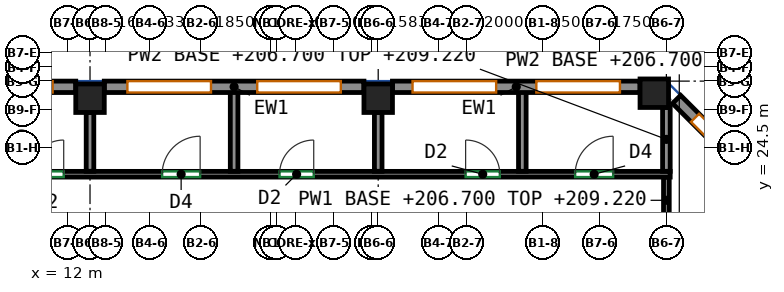
"""IFC4 building model, lengths in metres.
Left out: names, types, materials, properties, quantities, classifications, styles, units other than length and angle.
Written with IfcOpenShell. Run it as: python <this file> out.ifc"""

import sys

from ifc_helpers import new_model, si_unit, direction, frame, frame_2d, origin, origin_2d, place, context, subcontext, project, spatial, rectangle, extrude, source, transform, mapped, element, fill, save


model = new_model("IFC4")
c1 = context("Model", 3, precision=1e-05, world=origin(), true_north=direction((0.0, 1.0)))
c2 = subcontext(c1, "Body", "Model", "MODEL_VIEW")
j1 = project(units=[si_unit("LENGTHUNIT", "METRE"), si_unit("PLANEANGLEUNIT", "RADIAN")], contexts=[c1])
p1 = place(None, origin())
s1 = spatial("IfcSite", under=j1, at=p1, CompositionType="ELEMENT")
p2 = place(p1, origin())
s2 = spatial("IfcBuilding", under=s1, at=p2, CompositionType="ELEMENT")
p3 = place(p2, frame((0.0, 0.0, 206.7)))
s3 = spatial("IfcBuildingStorey", under=s2, at=p3, CompositionType="ELEMENT", Elevation=206.7)
m1 = source(origin(), c2, "Body", "SweptSolid", [
    extrude(rectangle(XDim=0.75, YDim=0.75, at=origin_2d()), origin(), (0.0, 0.0, 1.0), 3.12),
])
for number, where, z_axis, x_axis in (
    (1, (12.583, 25.8, 0.0), (0.0, 0.0, 1.0), (1.0, 0.0, 0.0)),
    (2, (20.167, 25.8, 0.0), (0.0, 0.0, 1.0), (1.0, 0.0, 0.0)),
    (3, (27.432, 25.932, 0.0), (0.0, 0.0, 1.0), (1.0, 0.0, 0.0)),
):
    element("IfcColumn", number, at=place(p3, frame(where, z_axis=z_axis, x_axis=x_axis)), inside=s3, PredefinedType="COLUMN", context=c2, shape_type="MappedRepresentation", body=[
        mapped(m1, transform((0.0, 0.0, 0.0))),
    ])
m2 = source(origin(), c2, "Body", "SweptSolid", [
    extrude(rectangle(XDim=3.571, YDim=0.3, at=frame_2d((1.786, 0.0))), origin(), (0.0, 0.0, 1.0), 3.12),
])
p4 = place(p3, frame((30.544, 23.244, 0.0), z_axis=(0.0, 0.0, 1.0), x_axis=(-0.707140964879, 0.707072595841, 0.0)))
e4 = element("IfcWall", 4, at=p4, inside=s3, PredefinedType="SOLIDWALL", context=c2, shape_type="MappedRepresentation", body=[
    mapped(m2, transform((0.0, 0.0, 0.0))),
])
p5 = place(p4, frame((0.686, 0.0, 0.85)))
e5 = element("IfcOpeningElement", 5, at=p5, cuts=e4, PredefinedType="OPENING", context=c2, shape_type="SweptSolid", body=[
    extrude(rectangle(XDim=2.2, YDim=1.95, at=frame_2d((1.1, 0.975))), frame((0.0, 0.16, 0.0), z_axis=(0.0, -1.0, 0.0), x_axis=(1.0, 0.0, 0.0)), (0.0, 0.0, 1.0), 0.32),
])
m3 = source(origin(), c2, "Body", "SweptSolid", [
    extrude(rectangle(XDim=6.515, YDim=0.3, at=frame_2d((3.258, 0.0))), origin(), (0.0, 0.0, 1.0), 3.12),
])
p6 = place(p3, frame((27.057, 26.1, 0.0), z_axis=(0.0, 0.0, 1.0), x_axis=(-1.0, 0.0, 0.0)))
e6 = element("IfcWall", 6, at=p6, inside=s3, PredefinedType="SOLIDWALL", context=c2, shape_type="MappedRepresentation", body=[
    mapped(m3, transform((0.0, 0.0, 0.0))),
])
p7 = place(p6, frame((0.529, 0.0, 0.85)))
e7 = element("IfcOpeningElement", 7, at=p7, cuts=e6, PredefinedType="OPENING", context=c2, shape_type="SweptSolid", body=[
    extrude(rectangle(XDim=2.2, YDim=1.95, at=frame_2d((1.1, 0.975))), frame((0.0, 0.16, 0.0), z_axis=(0.0, -1.0, 0.0), x_axis=(1.0, 0.0, 0.0)), (0.0, 0.0, 1.0), 0.32),
])
p8 = place(p6, frame((3.786, 0.0, 0.85)))
e8 = element("IfcOpeningElement", 8, at=p8, cuts=e6, PredefinedType="OPENING", context=c2, shape_type="SweptSolid", body=[
    extrude(rectangle(XDim=2.2, YDim=1.95, at=frame_2d((1.1, 0.975))), frame((0.0, 0.16, 0.0), z_axis=(0.0, -1.0, 0.0), x_axis=(1.0, 0.0, 0.0)), (0.0, 0.0, 1.0), 0.32),
])
m4 = source(origin(), c2, "Body", "SweptSolid", [
    extrude(rectangle(XDim=6.833, YDim=0.3, at=frame_2d((3.417, 0.0))), origin(), (0.0, 0.0, 1.0), 3.12),
])
p9 = place(p3, frame((19.792, 26.1, 0.0), z_axis=(0.0, 0.0, 1.0), x_axis=(-1.0, 0.0, 0.0)))
e9 = element("IfcWall", 9, at=p9, inside=s3, PredefinedType="SOLIDWALL", context=c2, shape_type="MappedRepresentation", body=[
    mapped(m4, transform((0.0, 0.0, 0.0))),
])
p10 = place(p9, frame((0.608, 0.0, 0.85)))
e10 = element("IfcOpeningElement", 10, at=p10, cuts=e9, PredefinedType="OPENING", context=c2, shape_type="SweptSolid", body=[
    extrude(rectangle(XDim=2.2, YDim=1.95, at=frame_2d((1.1, 0.975))), frame((0.0, 0.16, 0.0), z_axis=(0.0, -1.0, 0.0), x_axis=(1.0, 0.0, 0.0)), (0.0, 0.0, 1.0), 0.32),
])
p11 = place(p9, frame((4.025, 0.0, 0.85)))
e11 = element("IfcOpeningElement", 11, at=p11, cuts=e9, PredefinedType="OPENING", context=c2, shape_type="SweptSolid", body=[
    extrude(rectangle(XDim=2.2, YDim=1.95, at=frame_2d((1.1, 0.975))), frame((0.0, 0.16, 0.0), z_axis=(0.0, -1.0, 0.0), x_axis=(1.0, 0.0, 0.0)), (0.0, 0.0, 1.0), 0.32),
])
m5 = source(origin(), c2, "Body", "SweptSolid", [
    extrude(rectangle(XDim=6.833, YDim=0.3, at=frame_2d((3.417, 0.0))), origin(), (0.0, 0.0, 1.0), 3.12),
])
p12 = place(p3, frame((12.208, 26.1, 0.0), z_axis=(0.0, 0.0, 1.0), x_axis=(-1.0, 0.0, 0.0)))
e12 = element("IfcWall", 12, at=p12, inside=s3, PredefinedType="SOLIDWALL", context=c2, shape_type="MappedRepresentation", body=[
    mapped(m5, transform((0.0, 0.0, 0.0))),
])
p13 = place(p12, frame((0.608, 0.0, 0.85)))
e13 = element("IfcOpeningElement", 13, at=p13, cuts=e12, PredefinedType="OPENING", context=c2, shape_type="SweptSolid", body=[
    extrude(rectangle(XDim=2.2, YDim=1.95, at=frame_2d((1.1, 0.975))), frame((0.0, 0.16, 0.0), z_axis=(0.0, -1.0, 0.0), x_axis=(1.0, 0.0, 0.0)), (0.0, 0.0, 1.0), 0.32),
])
p14 = place(p12, frame((4.025, 0.0, 0.85)))
e14 = element("IfcOpeningElement", 14, at=p14, cuts=e12, PredefinedType="OPENING", context=c2, shape_type="SweptSolid", body=[
    extrude(rectangle(XDim=2.2, YDim=1.95, at=frame_2d((1.1, 0.975))), frame((0.0, 0.16, 0.0), z_axis=(0.0, -1.0, 0.0), x_axis=(1.0, 0.0, 0.0)), (0.0, 0.0, 1.0), 0.32),
])
p15 = place(p3, frame((27.75, 22.503, 0.0), z_axis=(0.0, 0.0, 1.0), x_axis=(0.0, 1.0, 0.0)))
e15 = element("IfcWall", 15, at=p15, inside=s3, PredefinedType="PARTITIONING", context=c2, shape_type="SweptSolid", body=[
    extrude(rectangle(XDim=1.222, YDim=0.15, at=frame_2d((0.611, 0.0))), origin(), (0.0, 0.0, 1.0), 2.52),
])
p16 = place(p3, frame((-17.85, 23.8, 0.0), z_axis=(0.0, 0.0, 1.0), x_axis=(1.0, 0.0, 0.0)))
e16 = element("IfcWall", 16, at=p16, inside=s3, PredefinedType="PARTITIONING", context=c2, shape_type="SweptSolid", body=[
    extrude(rectangle(XDim=45.7, YDim=0.15, at=frame_2d((22.85, 0.0))), origin(), (0.0, 0.0, 1.0), 3.12),
])
p17 = place(p16, frame((0.6, 0.0, 0.0)))
e17 = element("IfcOpeningElement", 17, at=p17, cuts=e16, PredefinedType="OPENING", context=c2, shape_type="SweptSolid", body=[
    extrude(rectangle(XDim=0.9, YDim=2.1, at=frame_2d((0.45, 1.05))), frame((0.0, 0.085, 0.0), z_axis=(0.0, -1.0, 0.0), x_axis=(1.0, 0.0, 0.0)), (0.0, 0.0, 1.0), 0.17),
])
p18 = place(p16, frame((4.081, 0.0, 0.0)))
e18 = element("IfcOpeningElement", 18, at=p18, cuts=e16, PredefinedType="OPENING", context=c2, shape_type="SweptSolid", body=[
    extrude(rectangle(XDim=1.0, YDim=2.1, at=frame_2d((0.5, 1.05))), frame((0.0, 0.085, 0.0), z_axis=(0.0, -1.0, 0.0), x_axis=(1.0, 0.0, 0.0)), (0.0, 0.0, 1.0), 0.17),
])
p19 = place(p16, frame((9.481, 0.0, 0.0)))
e19 = element("IfcOpeningElement", 19, at=p19, cuts=e16, PredefinedType="OPENING", context=c2, shape_type="SweptSolid", body=[
    extrude(rectangle(XDim=0.9, YDim=2.1, at=frame_2d((0.45, 1.05))), frame((0.0, 0.085, 0.0), z_axis=(0.0, -1.0, 0.0), x_axis=(1.0, 0.0, 0.0)), (0.0, 0.0, 1.0), 0.17),
])
p20 = place(p16, frame((12.803, 0.0, 0.0)))
e20 = element("IfcOpeningElement", 20, at=p20, cuts=e16, PredefinedType="OPENING", context=c2, shape_type="SweptSolid", body=[
    extrude(rectangle(XDim=1.0, YDim=2.1, at=frame_2d((0.5, 1.05))), frame((0.0, 0.085, 0.0), z_axis=(0.0, -1.0, 0.0), x_axis=(1.0, 0.0, 0.0)), (0.0, 0.0, 1.0), 0.17),
])
p21 = place(p16, frame((15.489, 0.0, 0.0)))
e21 = element("IfcOpeningElement", 21, at=p21, cuts=e16, PredefinedType="OPENING", context=c2, shape_type="SweptSolid", body=[
    extrude(rectangle(XDim=0.9, YDim=2.1, at=frame_2d((0.45, 1.05))), frame((0.0, 0.085, 0.0), z_axis=(0.0, -1.0, 0.0), x_axis=(1.0, 0.0, 0.0)), (0.0, 0.0, 1.0), 0.17),
])
p22 = place(p16, frame((21.244, 0.0, 0.0)))
e22 = element("IfcOpeningElement", 22, at=p22, cuts=e16, PredefinedType="OPENING", context=c2, shape_type="SweptSolid", body=[
    extrude(rectangle(XDim=0.9, YDim=2.1, at=frame_2d((0.45, 1.05))), frame((0.0, 0.085, 0.0), z_axis=(0.0, -1.0, 0.0), x_axis=(1.0, 0.0, 0.0)), (0.0, 0.0, 1.0), 0.17),
])
p23 = place(p16, frame((23.542, 0.0, 0.0)))
e23 = element("IfcOpeningElement", 23, at=p23, cuts=e16, PredefinedType="OPENING", context=c2, shape_type="SweptSolid", body=[
    extrude(rectangle(XDim=1.0, YDim=2.1, at=frame_2d((0.5, 1.05))), frame((0.0, 0.085, 0.0), z_axis=(0.0, -1.0, 0.0), x_axis=(1.0, 0.0, 0.0)), (0.0, 0.0, 1.0), 0.17),
])
p24 = place(p16, frame((28.841, 0.0, 0.0)))
e24 = element("IfcOpeningElement", 24, at=p24, cuts=e16, PredefinedType="OPENING", context=c2, shape_type="SweptSolid", body=[
    extrude(rectangle(XDim=0.9, YDim=2.1, at=frame_2d((0.45, 1.05))), frame((0.0, 0.085, 0.0), z_axis=(0.0, -1.0, 0.0), x_axis=(1.0, 0.0, 0.0)), (0.0, 0.0, 1.0), 0.17),
])
p25 = place(p16, frame((32.331, 0.0, 0.0)))
e25 = element("IfcOpeningElement", 25, at=p25, cuts=e16, PredefinedType="OPENING", context=c2, shape_type="SweptSolid", body=[
    extrude(rectangle(XDim=1.0, YDim=2.1, at=frame_2d((0.5, 1.05))), frame((0.0, 0.085, 0.0), z_axis=(0.0, -1.0, 0.0), x_axis=(1.0, 0.0, 0.0)), (0.0, 0.0, 1.0), 0.17),
])
p26 = place(p16, frame((35.42, 0.0, 0.0)))
e26 = element("IfcOpeningElement", 26, at=p26, cuts=e16, PredefinedType="OPENING", context=c2, shape_type="SweptSolid", body=[
    extrude(rectangle(XDim=0.9, YDim=2.1, at=frame_2d((0.45, 1.05))), frame((0.0, 0.085, 0.0), z_axis=(0.0, -1.0, 0.0), x_axis=(1.0, 0.0, 0.0)), (0.0, 0.0, 1.0), 0.17),
])
p27 = place(p16, frame((40.317, 0.0, 0.0)))
e27 = element("IfcOpeningElement", 27, at=p27, cuts=e16, PredefinedType="OPENING", context=c2, shape_type="SweptSolid", body=[
    extrude(rectangle(XDim=0.9, YDim=2.1, at=frame_2d((0.45, 1.05))), frame((0.0, 0.085, 0.0), z_axis=(0.0, -1.0, 0.0), x_axis=(1.0, 0.0, 0.0)), (0.0, 0.0, 1.0), 0.17),
])
p28 = place(p16, frame((43.199, 0.0, 0.0)))
e28 = element("IfcOpeningElement", 28, at=p28, cuts=e16, PredefinedType="OPENING", context=c2, shape_type="SweptSolid", body=[
    extrude(rectangle(XDim=1.0, YDim=2.1, at=frame_2d((0.5, 1.05))), frame((0.0, 0.085, 0.0), z_axis=(0.0, -1.0, 0.0), x_axis=(1.0, 0.0, 0.0)), (0.0, 0.0, 1.0), 0.17),
])
p29 = place(p3, frame((27.75, 25.557, 0.0), z_axis=(0.0, 0.0, 1.0), x_axis=(0.0, -1.0, 0.0)))
e29 = element("IfcWall", 29, at=p29, inside=s3, PredefinedType="PARTITIONING", context=c2, shape_type="SweptSolid", body=[
    extrude(rectangle(XDim=1.68, YDim=0.2, at=frame_2d((0.84, 0.0))), origin(), (0.0, 0.0, 1.0), 2.52),
])
p30 = place(p3, frame((12.583, 23.877, 0.0), z_axis=(0.0, 0.0, 1.0), x_axis=(0.0, 1.0, 0.0)))
e30 = element("IfcWall", 30, at=p30, inside=s3, PredefinedType="PARTITIONING", context=c2, shape_type="SweptSolid", body=[
    extrude(rectangle(XDim=1.548, YDim=0.2, at=frame_2d((0.774, 0.0))), origin(), (0.0, 0.0, 1.0), 3.12),
])
p31 = place(p3, frame((16.375, 23.877, 0.0), z_axis=(0.0, 0.0, 1.0), x_axis=(0.0, 1.0, 0.0)))
e31 = element("IfcWall", 31, at=p31, inside=s3, PredefinedType="PARTITIONING", context=c2, shape_type="SweptSolid", body=[
    extrude(rectangle(XDim=2.123, YDim=0.2, at=frame_2d((1.062, 0.0))), origin(), (0.0, 0.0, 1.0), 3.12),
])
p32 = place(p3, frame((20.167, 23.877, 0.0), z_axis=(0.0, 0.0, 1.0), x_axis=(0.0, 1.0, 0.0)))
e32 = element("IfcWall", 32, at=p32, inside=s3, PredefinedType="PARTITIONING", context=c2, shape_type="SweptSolid", body=[
    extrude(rectangle(XDim=1.548, YDim=0.2, at=frame_2d((0.774, 0.0))), origin(), (0.0, 0.0, 1.0), 3.12),
])
p33 = place(p3, frame((23.959, 23.877, 0.0), z_axis=(0.0, 0.0, 1.0), x_axis=(0.0, 1.0, 0.0)))
e33 = element("IfcWall", 33, at=p33, inside=s3, PredefinedType="PARTITIONING", context=c2, shape_type="SweptSolid", body=[
    extrude(rectangle(XDim=2.123, YDim=0.2, at=frame_2d((1.062, 0.0))), origin(), (0.0, 0.0, 1.0), 3.12),
])
p34 = place(p5, origin())
e34 = element("IfcWindow", 34, at=p34, inside=s3, PartitioningType="SINGLE_PANEL", PredefinedType="WINDOW", context=c2, shape_type="SweptSolid", body=[
    extrude(rectangle(XDim=2.2, YDim=1.95, at=frame_2d((1.1, 0.975))), frame((0.0, 0.03, 0.0), z_axis=(0.0, -1.0, 0.0), x_axis=(1.0, 0.0, 0.0)), (0.0, 0.0, 1.0), 0.06),
])
fill(e5, e34)
p35 = place(p7, origin())
e35 = element("IfcWindow", 35, at=p35, inside=s3, PartitioningType="SINGLE_PANEL", PredefinedType="WINDOW", context=c2, shape_type="SweptSolid", body=[
    extrude(rectangle(XDim=2.2, YDim=1.95, at=frame_2d((1.1, 0.975))), frame((0.0, 0.03, 0.0), z_axis=(0.0, -1.0, 0.0), x_axis=(1.0, 0.0, 0.0)), (0.0, 0.0, 1.0), 0.06),
])
fill(e7, e35)
p36 = place(p8, origin())
e36 = element("IfcWindow", 36, at=p36, inside=s3, PartitioningType="SINGLE_PANEL", PredefinedType="WINDOW", context=c2, shape_type="SweptSolid", body=[
    extrude(rectangle(XDim=2.2, YDim=1.95, at=frame_2d((1.1, 0.975))), frame((0.0, 0.03, 0.0), z_axis=(0.0, -1.0, 0.0), x_axis=(1.0, 0.0, 0.0)), (0.0, 0.0, 1.0), 0.06),
])
fill(e8, e36)
p37 = place(p10, origin())
e37 = element("IfcWindow", 37, at=p37, inside=s3, PartitioningType="SINGLE_PANEL", PredefinedType="WINDOW", context=c2, shape_type="SweptSolid", body=[
    extrude(rectangle(XDim=2.2, YDim=1.95, at=frame_2d((1.1, 0.975))), frame((0.0, 0.03, 0.0), z_axis=(0.0, -1.0, 0.0), x_axis=(1.0, 0.0, 0.0)), (0.0, 0.0, 1.0), 0.06),
])
fill(e10, e37)
p38 = place(p11, origin())
e38 = element("IfcWindow", 38, at=p38, inside=s3, PartitioningType="SINGLE_PANEL", PredefinedType="WINDOW", context=c2, shape_type="SweptSolid", body=[
    extrude(rectangle(XDim=2.2, YDim=1.95, at=frame_2d((1.1, 0.975))), frame((0.0, 0.03, 0.0), z_axis=(0.0, -1.0, 0.0), x_axis=(1.0, 0.0, 0.0)), (0.0, 0.0, 1.0), 0.06),
])
fill(e11, e38)
p39 = place(p13, origin())
e39 = element("IfcWindow", 39, at=p39, inside=s3, PartitioningType="SINGLE_PANEL", PredefinedType="WINDOW", context=c2, shape_type="SweptSolid", body=[
    extrude(rectangle(XDim=2.2, YDim=1.95, at=frame_2d((1.1, 0.975))), frame((0.0, 0.03, 0.0), z_axis=(0.0, -1.0, 0.0), x_axis=(1.0, 0.0, 0.0)), (0.0, 0.0, 1.0), 0.06),
])
fill(e13, e39)
p40 = place(p24, origin())
e40 = element("IfcDoor", 40, at=p40, inside=s3, OperationType="SINGLE_SWING_RIGHT", PredefinedType="DOOR", context=c2, shape_type="SweptSolid", body=[
    extrude(rectangle(XDim=0.9, YDim=2.1, at=frame_2d((0.45, 1.05))), frame((0.0, 0.025, 0.0), z_axis=(0.0, -1.0, 0.0), x_axis=(1.0, 0.0, 0.0)), (0.0, 0.0, 1.0), 0.05),
])
fill(e24, e40)
p41 = place(p25, origin())
e41 = element("IfcDoor", 41, at=p41, inside=s3, OperationType="SINGLE_SWING_RIGHT", PredefinedType="DOOR", context=c2, shape_type="SweptSolid", body=[
    extrude(rectangle(XDim=1.0, YDim=2.1, at=frame_2d((0.5, 1.05))), frame((0.0, 0.025, 0.0), z_axis=(0.0, -1.0, 0.0), x_axis=(1.0, 0.0, 0.0)), (0.0, 0.0, 1.0), 0.05),
])
fill(e25, e41)
p42 = place(p26, origin())
e42 = element("IfcDoor", 42, at=p42, inside=s3, OperationType="SINGLE_SWING_RIGHT", PredefinedType="DOOR", context=c2, shape_type="SweptSolid", body=[
    extrude(rectangle(XDim=0.9, YDim=2.1, at=frame_2d((0.45, 1.05))), frame((0.0, 0.025, 0.0), z_axis=(0.0, -1.0, 0.0), x_axis=(1.0, 0.0, 0.0)), (0.0, 0.0, 1.0), 0.05),
])
fill(e26, e42)
p43 = place(p27, origin())
e43 = element("IfcDoor", 43, at=p43, inside=s3, OperationType="SINGLE_SWING_LEFT", PredefinedType="DOOR", context=c2, shape_type="SweptSolid", body=[
    extrude(rectangle(XDim=0.9, YDim=2.1, at=frame_2d((0.45, 1.05))), frame((0.0, 0.025, 0.0), z_axis=(0.0, -1.0, 0.0), x_axis=(1.0, 0.0, 0.0)), (0.0, 0.0, 1.0), 0.05),
])
fill(e27, e43)
p44 = place(p28, origin())
e44 = element("IfcDoor", 44, at=p44, inside=s3, OperationType="SINGLE_SWING_RIGHT", PredefinedType="DOOR", context=c2, shape_type="SweptSolid", body=[
    extrude(rectangle(XDim=1.0, YDim=2.1, at=frame_2d((0.5, 1.05))), frame((0.0, 0.025, 0.0), z_axis=(0.0, -1.0, 0.0), x_axis=(1.0, 0.0, 0.0)), (0.0, 0.0, 1.0), 0.05),
])
fill(e28, e44)
save(model, sys.argv[1])
